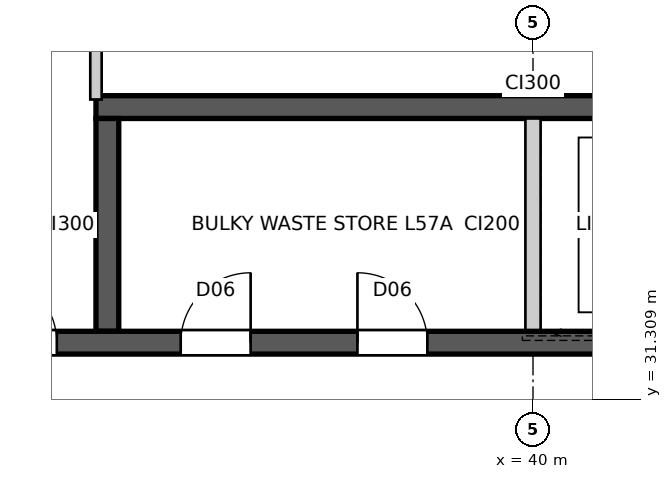
"""IFC4 building model, lengths in metres.
Left out: names, types, materials, properties, quantities, classifications, styles, units other than length and angle.
Written with IfcOpenShell. Run it as: python <this file> out.ifc"""

import sys

from ifc_helpers import new_model, si_unit, direction, frame, frame_2d, origin, place, context, subcontext, project, spatial, rectangle, extrude, element, fill, save


model = new_model("IFC4")
c1 = context("Model", 3, precision=1e-05, world=origin(), true_north=direction((0.0, 1.0)))
c2 = subcontext(c1, "Body", "Model", "MODEL_VIEW")
j1 = project(units=[si_unit("LENGTHUNIT", "METRE"), si_unit("PLANEANGLEUNIT", "RADIAN")], contexts=[c1])
p1 = place(None, origin())
s1 = spatial("IfcSite", under=j1, at=p1, CompositionType="ELEMENT")
p2 = place(p1, origin())
s2 = spatial("IfcBuilding", under=s1, at=p2, CompositionType="ELEMENT")
p3 = place(p2, frame((0.0, 0.0, 208.2)))
s3 = spatial("IfcBuildingStorey", under=s2, at=p3, CompositionType="ELEMENT", Elevation=208.2)
p4 = place(p3, frame((28.8, 32.05, 0.0), z_axis=(0.0, 0.0, 1.0), x_axis=(1.0, 0.0, 0.0)))
e1 = element("IfcWall", 1, at=p4, inside=s3, PredefinedType="SHEAR", context=c2, shape_type="SweptSolid", body=[
    extrude(rectangle(XDim=22.4, YDim=0.3, at=frame_2d((11.2, 0.0))), origin(), (0.0, 0.0, 1.0), 3.4),
])
p5 = place(p4, frame((19.04, 0.0, 0.0)))
e2 = element("IfcOpeningElement", 2, at=p5, cuts=e1, PredefinedType="OPENING", context=c2, shape_type="SweptSolid", body=[
    extrude(rectangle(XDim=0.92, YDim=2.1, at=frame_2d((0.46, 1.05))), frame((0.0, 0.16, 0.0), z_axis=(0.0, -1.0, 0.0), x_axis=(1.0, 0.0, 0.0)), (0.0, 0.0, 1.0), 0.32),
])
p6 = place(p4, frame((1.265, 0.0, 0.0)))
e3 = element("IfcOpeningElement", 3, at=p6, cuts=e1, PredefinedType="OPENING", context=c2, shape_type="SweptSolid", body=[
    extrude(rectangle(XDim=1.02, YDim=2.1, at=frame_2d((0.51, 1.05))), frame((0.0, 0.16, 0.0), z_axis=(0.0, -1.0, 0.0), x_axis=(1.0, 0.0, 0.0)), (0.0, 0.0, 1.0), 0.32),
])
p7 = place(p4, frame((4.015, 0.0, 0.0)))
e4 = element("IfcOpeningElement", 4, at=p7, cuts=e1, PredefinedType="OPENING", context=c2, shape_type="SweptSolid", body=[
    extrude(rectangle(XDim=0.92, YDim=2.1, at=frame_2d((0.46, 1.05))), frame((0.0, 0.16, 0.0), z_axis=(0.0, -1.0, 0.0), x_axis=(1.0, 0.0, 0.0)), (0.0, 0.0, 1.0), 0.32),
])
p8 = place(p4, frame((6.565, 0.0, 0.0)))
e5 = element("IfcOpeningElement", 5, at=p8, cuts=e1, PredefinedType="OPENING", context=c2, shape_type="SweptSolid", body=[
    extrude(rectangle(XDim=0.92, YDim=2.1, at=frame_2d((0.46, 1.05))), frame((0.0, 0.16, 0.0), z_axis=(0.0, -1.0, 0.0), x_axis=(1.0, 0.0, 0.0)), (0.0, 0.0, 1.0), 0.32),
])
p9 = place(p4, frame((8.89, 0.0, 0.0)))
e6 = element("IfcOpeningElement", 6, at=p9, cuts=e1, PredefinedType="OPENING", context=c2, shape_type="SweptSolid", body=[
    extrude(rectangle(XDim=0.92, YDim=2.1, at=frame_2d((0.46, 1.05))), frame((0.0, 0.16, 0.0), z_axis=(0.0, -1.0, 0.0), x_axis=(1.0, 0.0, 0.0)), (0.0, 0.0, 1.0), 0.32),
])
p10 = place(p4, frame((12.05, 0.0, 0.0)))
e7 = element("IfcOpeningElement", 7, at=p10, cuts=e1, PredefinedType="OPENING", context=c2, shape_type="SweptSolid", body=[
    extrude(rectangle(XDim=1.1, YDim=2.1, at=frame_2d((0.55, 1.05))), frame((0.0, 0.16, 0.0), z_axis=(0.0, -1.0, 0.0), x_axis=(1.0, 0.0, 0.0)), (0.0, 0.0, 1.0), 0.32),
])
p11 = place(p4, frame((14.85, 0.0, 0.0)))
e8 = element("IfcOpeningElement", 8, at=p11, cuts=e1, PredefinedType="OPENING", context=c2, shape_type="SweptSolid", body=[
    extrude(rectangle(XDim=1.1, YDim=2.1, at=frame_2d((0.55, 1.05))), frame((0.0, 0.16, 0.0), z_axis=(0.0, -1.0, 0.0), x_axis=(1.0, 0.0, 0.0)), (0.0, 0.0, 1.0), 0.32),
])
p12 = place(p3, frame((34.25, 35.15, 0.0), z_axis=(0.0, 0.0, 1.0), x_axis=(1.0, 0.0, 0.0)))
e9 = element("IfcWall", 9, at=p12, inside=s3, PredefinedType="SHEAR", context=c2, shape_type="SweptSolid", body=[
    extrude(rectangle(XDim=11.5, YDim=0.3, at=frame_2d((5.75, 0.0))), origin(), (0.0, 0.0, 1.0), 3.4),
])
p13 = place(p3, frame((34.4, 32.2, 0.0), z_axis=(0.0, 0.0, 1.0), x_axis=(0.0, 1.0, 0.0)))
e10 = element("IfcWall", 10, at=p13, inside=s3, PredefinedType="SHEAR", context=c2, shape_type="SweptSolid", body=[
    extrude(rectangle(XDim=2.8, YDim=0.3, at=frame_2d((1.4, 0.0))), origin(), (0.0, 0.0, 1.0), 3.4),
])
p14 = place(p3, frame((40.0, 32.2, 0.0), z_axis=(0.0, 0.0, 1.0), x_axis=(0.0, 1.0, 0.0)))
e11 = element("IfcWall", 11, at=p14, inside=s3, PredefinedType="SOLIDWALL", context=c2, shape_type="SweptSolid", body=[
    extrude(rectangle(XDim=2.8, YDim=0.2, at=frame_2d((1.4, 0.0))), origin(), (0.0, 0.0, 1.0), 3.4),
])
p15 = place(p3, frame((34.25, 41.2, 0.0), z_axis=(0.0, 0.0, 1.0), x_axis=(0.0, -1.0, 0.0)))
e12 = element("IfcWall", 12, at=p15, inside=s3, PredefinedType="SOLIDWALL", context=c2, shape_type="SweptSolid", body=[
    extrude(rectangle(XDim=5.95, YDim=0.15, at=frame_2d((2.975, 0.0))), origin(), (0.0, 0.0, 1.0), 3.25),
])
p16 = place(p15, frame((2.515, 0.0, 0.0)))
e13 = element("IfcOpeningElement", 13, at=p16, cuts=e12, PredefinedType="OPENING", context=c2, shape_type="SweptSolid", body=[
    extrude(rectangle(XDim=0.92, YDim=2.1, at=frame_2d((0.46, 1.05))), frame((0.0, 0.085, 0.0), z_axis=(0.0, -1.0, 0.0), x_axis=(1.0, 0.0, 0.0)), (0.0, 0.0, 1.0), 0.17),
])
p17 = place(p7, origin())
e14 = element("IfcDoor", 14, at=p17, inside=s3, OperationType="SINGLE_SWING_LEFT", PredefinedType="DOOR", context=c2, shape_type="SweptSolid", body=[
    extrude(rectangle(XDim=0.92, YDim=2.1, at=frame_2d((0.46, 1.05))), frame((0.0, 0.025, 0.0), z_axis=(0.0, -1.0, 0.0), x_axis=(1.0, 0.0, 0.0)), (0.0, 0.0, 1.0), 0.05),
])
fill(e4, e14)
p18 = place(p8, origin())
e15 = element("IfcDoor", 15, at=p18, inside=s3, OperationType="SINGLE_SWING_RIGHT", PredefinedType="DOOR", context=c2, shape_type="SweptSolid", body=[
    extrude(rectangle(XDim=0.92, YDim=2.1, at=frame_2d((0.46, 1.05))), frame((0.0, 0.025, 0.0), z_axis=(0.0, -1.0, 0.0), x_axis=(1.0, 0.0, 0.0)), (0.0, 0.0, 1.0), 0.05),
])
fill(e5, e15)
p19 = place(p9, origin())
e16 = element("IfcDoor", 16, at=p19, inside=s3, OperationType="SINGLE_SWING_LEFT", PredefinedType="DOOR", context=c2, shape_type="SweptSolid", body=[
    extrude(rectangle(XDim=0.92, YDim=2.1, at=frame_2d((0.46, 1.05))), frame((0.0, 0.025, 0.0), z_axis=(0.0, -1.0, 0.0), x_axis=(1.0, 0.0, 0.0)), (0.0, 0.0, 1.0), 0.05),
])
fill(e6, e16)
save(model, sys.argv[1])
